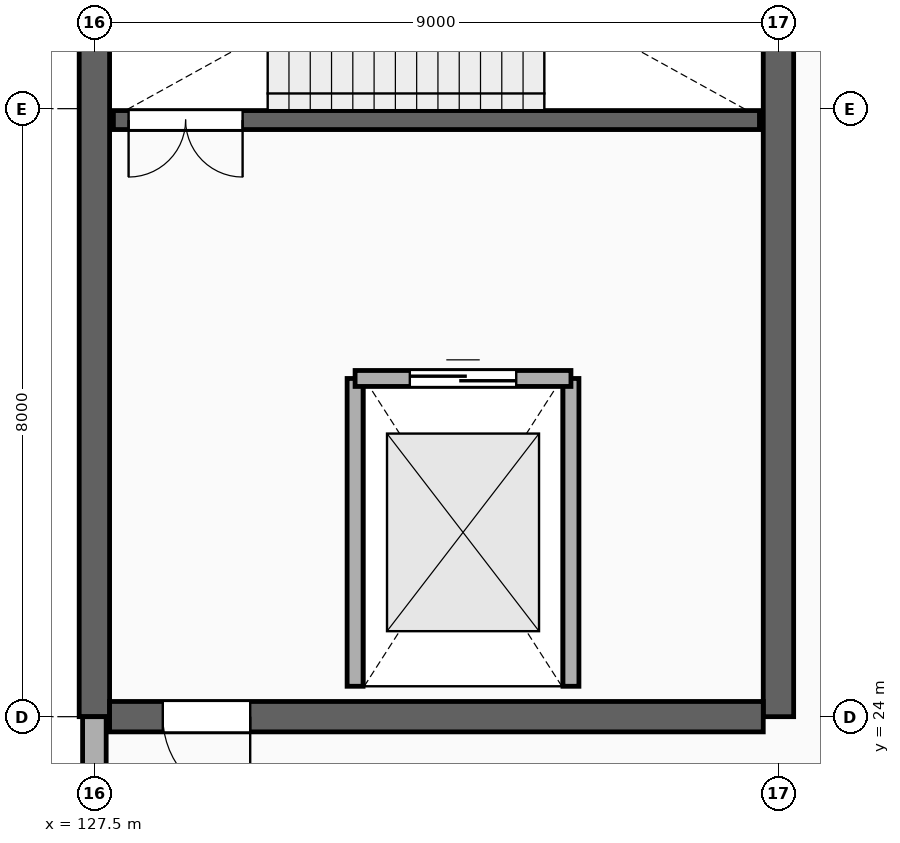
"""IFC4 building model, lengths in metres.
Left out: names, types, materials, properties, quantities, classifications, styles, units other than length and angle.
Written with IfcOpenShell. Run it as: python <this file> out.ifc"""

import sys

from ifc_helpers import new_model, si_unit, direction, frame, frame_2d, origin, place, context, subcontext, project, spatial, rectangle, extrude, element, fill, save


model = new_model("IFC4")
c1 = context("Model", 3, precision=1e-05, world=origin(), true_north=direction((0.0, 1.0)))
c2 = subcontext(c1, "Body", "Model", "MODEL_VIEW")
j1 = project(units=[si_unit("LENGTHUNIT", "METRE"), si_unit("PLANEANGLEUNIT", "RADIAN")], contexts=[c1])
p1 = place(None, origin())
s1 = spatial("IfcSite", under=j1, at=p1, CompositionType="ELEMENT")
p2 = place(p1, origin())
s2 = spatial("IfcBuilding", under=s1, at=p2, CompositionType="ELEMENT")
p3 = place(p2, frame((0.0, 0.0, 10.2)))
s3 = spatial("IfcBuildingStorey", under=s2, at=p3, CompositionType="ELEMENT", Elevation=10.2)
for number, where, z_axis, x_axis in (
    (1, (127.5, 24.0, 0.0), (0.0, 0.0, 1.0), (0.0, 1.0, 0.0)),
    (2, (136.5, 24.0, 0.0), (0.0, 0.0, 1.0), (0.0, 1.0, 0.0)),
):
    element("IfcWall", number, at=place(p3, frame(where, z_axis=z_axis, x_axis=x_axis)), inside=s3, PredefinedType="SHEAR", context=c2, shape_type="SweptSolid", body=[
        extrude(rectangle(XDim=12.8, YDim=0.4, at=frame_2d((6.4, 0.0))), origin(), (0.0, 0.0, 1.0), 4.64),
    ])
p4 = place(p3, frame((127.7, 24.0, 0.0), z_axis=(0.0, 0.0, 1.0), x_axis=(1.0, 0.0, 0.0)))
e3 = element("IfcWall", 3, at=p4, inside=s3, PredefinedType="SHEAR", context=c2, shape_type="SweptSolid", body=[
    extrude(rectangle(XDim=8.6, YDim=0.4, at=frame_2d((4.3, 0.0))), origin(), (0.0, 0.0, 1.0), 4.64),
])
p5 = place(p4, frame((0.7, 0.0, 0.0)))
e4 = element("IfcOpeningElement", 4, at=p5, cuts=e3, PredefinedType="OPENING", context=c2, shape_type="SweptSolid", body=[
    extrude(rectangle(XDim=1.15, YDim=2.2, at=frame_2d((0.575, 1.1))), frame((0.0, 0.212, 0.0), z_axis=(0.0, -1.0, 0.0), x_axis=(1.0, 0.0, 0.0)), (0.0, 0.0, 1.0), 0.424),
])
p6 = place(p3, frame((127.75, 31.85, 0.0), z_axis=(0.0, 0.0, 1.0), x_axis=(1.0, 0.0, 0.0)))
e5 = element("IfcWall", 5, at=p6, inside=s3, PredefinedType="STANDARD", context=c2, shape_type="SweptSolid", body=[
    extrude(rectangle(XDim=8.5, YDim=0.25, at=frame_2d((4.25, 0.0))), origin(), (0.0, 0.0, 1.0), 4.64),
])
p7 = place(p6, frame((0.2, 0.0, 0.0)))
e6 = element("IfcOpeningElement", 6, at=p7, cuts=e5, PredefinedType="OPENING", context=c2, shape_type="SweptSolid", body=[
    extrude(rectangle(XDim=1.5, YDim=2.2, at=frame_2d((0.75, 1.1))), frame((0.0, 0.137, 0.0), z_axis=(0.0, -1.0, 0.0), x_axis=(1.0, 0.0, 0.0)), (0.0, 0.0, 1.0), 0.274),
])
for number, where, z_axis, x_axis in (
    (7, (130.93, 24.4, 0.0), (0.0, 0.0, 1.0), (0.0, 1.0, 0.0)),
    (8, (133.77, 24.4, 0.0), (0.0, 0.0, 1.0), (0.0, 1.0, 0.0)),
):
    element("IfcWall", number, at=place(p3, frame(where, z_axis=z_axis, x_axis=x_axis)), inside=s3, PredefinedType="PARTITIONING", context=c2, shape_type="SweptSolid", body=[
        extrude(rectangle(XDim=4.05, YDim=0.21, at=frame_2d((2.025, 0.0))), origin(), (0.0, 0.0, 1.0), 4.64),
    ])
p8 = place(p3, frame((130.93, 28.45, 0.0), z_axis=(0.0, 0.0, 1.0), x_axis=(1.0, 0.0, 0.0)))
e9 = element("IfcWall", 9, at=p8, inside=s3, PredefinedType="PARTITIONING", context=c2, shape_type="SweptSolid", body=[
    extrude(rectangle(XDim=2.84, YDim=0.21, at=frame_2d((1.42, 0.0))), origin(), (0.0, 0.0, 1.0), 4.64),
])
p9 = place(p8, frame((0.72, 0.0, 0.0)))
e10 = element("IfcOpeningElement", 10, at=p9, cuts=e9, PredefinedType="OPENING", context=c2, shape_type="SweptSolid", body=[
    extrude(rectangle(XDim=1.4, YDim=2.35, at=frame_2d((0.7, 1.175))), frame((0.0, 0.117, 0.0), z_axis=(0.0, -1.0, 0.0), x_axis=(1.0, 0.0, 0.0)), (0.0, 0.0, 1.0), 0.234),
])
p10 = place(p3, frame((127.5, 11.96, 0.0), z_axis=(0.0, 0.0, 1.0), x_axis=(0.0, 1.0, 0.0)))
e11 = element("IfcWall", 11, at=p10, inside=s3, PredefinedType="STANDARD", context=c2, shape_type="SweptSolid", body=[
    extrude(rectangle(XDim=12.04, YDim=0.31, at=frame_2d((6.02, 0.0))), origin(), (0.0, 0.0, 1.0), 3.72),
])
p11 = place(p10, frame((2.21, 0.0, 1.0)))
e12 = element("IfcOpeningElement", 12, at=p11, cuts=e11, PredefinedType="OPENING", context=c2, shape_type="SweptSolid", body=[
    extrude(rectangle(XDim=1.6, YDim=2.2, at=frame_2d((0.8, 1.1))), frame((0.0, 0.167, 0.0), z_axis=(0.0, -1.0, 0.0), x_axis=(1.0, 0.0, 0.0)), (0.0, 0.0, 1.0), 0.334),
])
p12 = place(p10, frame((8.61, 0.0, 1.0)))
e13 = element("IfcOpeningElement", 13, at=p12, cuts=e11, PredefinedType="OPENING", context=c2, shape_type="SweptSolid", body=[
    extrude(rectangle(XDim=1.6, YDim=2.2, at=frame_2d((0.8, 1.1))), frame((0.0, 0.167, 0.0), z_axis=(0.0, -1.0, 0.0), x_axis=(1.0, 0.0, 0.0)), (0.0, 0.0, 1.0), 0.334),
])
p13 = place(p7, frame((1.5, 0.0, 0.0), z_axis=(0.0, 0.0, 1.0), x_axis=(-1.0, 0.0, 0.0)))
e14 = element("IfcDoor", 14, at=p13, inside=s3, OperationType="DOUBLE_DOOR_SINGLE_SWING", PredefinedType="DOOR", context=c2, shape_type="SweptSolid", body=[
    extrude(rectangle(XDim=1.5, YDim=2.2, at=frame_2d((0.75, 1.1))), frame((0.0, 0.025, 0.0), z_axis=(0.0, -1.0, 0.0), x_axis=(1.0, 0.0, 0.0)), (0.0, 0.0, 1.0), 0.05),
])
fill(e6, e14)
p14 = place(p9, origin())
e15 = element("IfcDoor", 15, at=p14, inside=s3, OperationType="DOUBLE_DOOR_SLIDING", PredefinedType="DOOR", context=c2, shape_type="SweptSolid", body=[
    extrude(rectangle(XDim=1.4, YDim=2.35, at=frame_2d((0.7, 1.175))), frame((0.0, 0.025, 0.0), z_axis=(0.0, -1.0, 0.0), x_axis=(1.0, 0.0, 0.0)), (0.0, 0.0, 1.0), 0.05),
])
fill(e10, e15)
p15 = place(p5, frame((1.15, 0.0, 0.0), z_axis=(0.0, 0.0, 1.0), x_axis=(-1.0, 0.0, 0.0)))
e16 = element("IfcDoor", 16, at=p15, inside=s3, OperationType="SINGLE_SWING_RIGHT", PredefinedType="DOOR", context=c2, shape_type="SweptSolid", body=[
    extrude(rectangle(XDim=1.15, YDim=2.2, at=frame_2d((0.575, 1.1))), frame((0.0, 0.025, 0.0), z_axis=(0.0, -1.0, 0.0), x_axis=(1.0, 0.0, 0.0)), (0.0, 0.0, 1.0), 0.05),
])
fill(e4, e16)
save(model, sys.argv[1])
